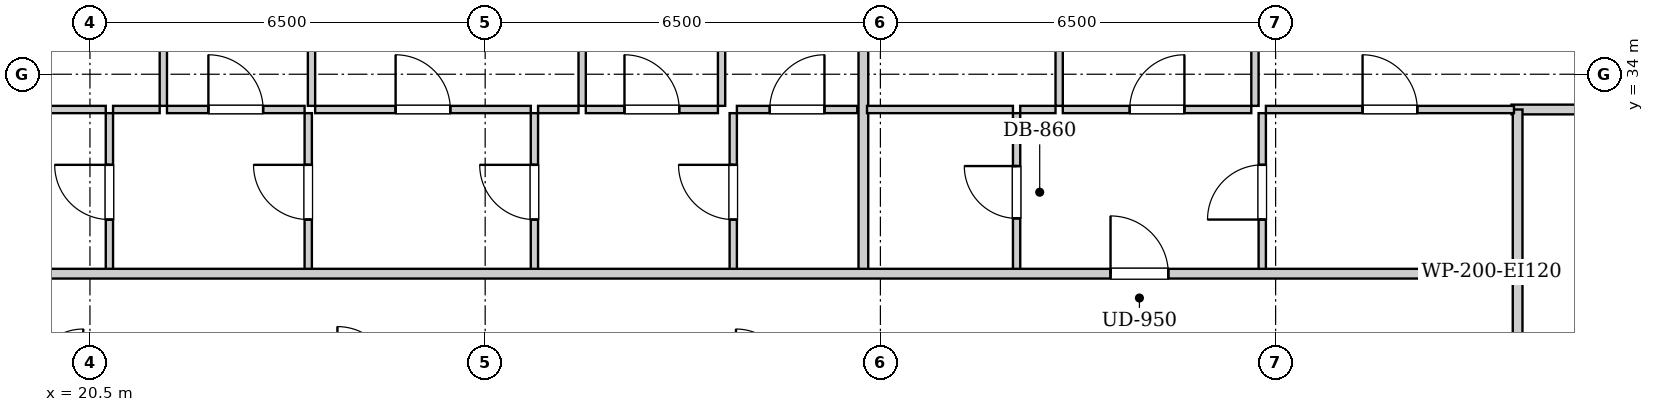
"""IFC4 building model, lengths in metres.
Left out: names, types, materials, properties, quantities, classifications, styles, units other than length and angle.
Written with IfcOpenShell. Run it as: python <this file> out.ifc"""

import sys

from ifc_helpers import new_model, si_unit, direction, frame, frame_2d, origin, place, context, subcontext, project, spatial, rectangle, extrude, element, fill, save


model = new_model("IFC4")
c1 = context("Model", 3, precision=1e-05, world=origin(), true_north=direction((0.0, 1.0)))
c2 = subcontext(c1, "Body", "Model", "MODEL_VIEW")
j1 = project(units=[si_unit("LENGTHUNIT", "METRE"), si_unit("PLANEANGLEUNIT", "RADIAN")], contexts=[c1])
p1 = place(None, origin())
s1 = spatial("IfcSite", under=j1, at=p1, CompositionType="ELEMENT")
p2 = place(p1, origin())
s2 = spatial("IfcBuilding", under=s1, at=p2, CompositionType="ELEMENT")
p3 = place(p2, frame((0.0, 0.0, 29.0)))
s3 = spatial("IfcBuildingStorey", under=s2, at=p3, CompositionType="ELEMENT", Elevation=29.0)
p4 = place(p3, frame((43.98, 28.98, 0.0), z_axis=(0.0, 0.0, 1.0), x_axis=(0.0, 1.0, 0.0)))
e1 = element("IfcWall", 1, at=p4, inside=s3, PredefinedType="PARTITIONING", context=c2, shape_type="SweptSolid", body=[
    extrude(rectangle(XDim=1.74, YDim=0.16, at=frame_2d((0.87, 0.0))), origin(), (0.0, 0.0, 1.0), 2.94),
])
p5 = place(p3, frame((20.82, 30.76, 0.0), z_axis=(0.0, 0.0, 1.0), x_axis=(0.0, 1.0, 0.0)))
e2 = element("IfcWall", 2, at=p5, inside=s3, PredefinedType="PARTITIONING", context=c2, shape_type="SweptSolid", body=[
    extrude(rectangle(XDim=2.6, YDim=0.12, at=frame_2d((1.3, 0.0))), origin(), (0.0, 0.0, 1.0), 2.94),
])
p6 = place(p5, frame((0.85, 0.0, 0.0)))
e3 = element("IfcOpeningElement", 3, at=p6, cuts=e2, PredefinedType="OPENING", context=c2, shape_type="SweptSolid", body=[
    extrude(rectangle(XDim=0.9, YDim=2.05, at=frame_2d((0.45, 1.025))), frame((0.0, 0.07, 0.0), z_axis=(0.0, -1.0, 0.0), x_axis=(1.0, 0.0, 0.0)), (0.0, 0.0, 1.0), 0.14),
])
p7 = place(p3, frame((17.664, 33.42, 0.0), z_axis=(0.0, 0.0, 1.0), x_axis=(1.0, 0.0, 0.0)))
e4 = element("IfcWall", 4, at=p7, inside=s3, PredefinedType="PARTITIONING", context=c2, shape_type="SweptSolid", body=[
    extrude(rectangle(XDim=3.096, YDim=0.12, at=frame_2d((1.548, 0.0))), origin(), (0.0, 0.0, 1.0), 2.94),
])
p8 = place(p7, frame((1.098, 0.0, 0.0)))
e5 = element("IfcOpeningElement", 5, at=p8, cuts=e4, PredefinedType="OPENING", context=c2, shape_type="SweptSolid", body=[
    extrude(rectangle(XDim=0.9, YDim=2.05, at=frame_2d((0.45, 1.025))), frame((0.0, 0.07, 0.0), z_axis=(0.0, -1.0, 0.0), x_axis=(1.0, 0.0, 0.0)), (0.0, 0.0, 1.0), 0.14),
])
p9 = place(p3, frame((24.09, 30.76, 0.0), z_axis=(0.0, 0.0, 1.0), x_axis=(0.0, 1.0, 0.0)))
e6 = element("IfcWall", 6, at=p9, inside=s3, PredefinedType="PARTITIONING", context=c2, shape_type="SweptSolid", body=[
    extrude(rectangle(XDim=2.6, YDim=0.12, at=frame_2d((1.3, 0.0))), origin(), (0.0, 0.0, 1.0), 2.94),
])
p10 = place(p9, frame((0.85, 0.0, 0.0)))
e7 = element("IfcOpeningElement", 7, at=p10, cuts=e6, PredefinedType="OPENING", context=c2, shape_type="SweptSolid", body=[
    extrude(rectangle(XDim=0.9, YDim=2.05, at=frame_2d((0.45, 1.025))), frame((0.0, 0.07, 0.0), z_axis=(0.0, -1.0, 0.0), x_axis=(1.0, 0.0, 0.0)), (0.0, 0.0, 1.0), 0.14),
])
p11 = place(p3, frame((20.88, 33.42, 0.0), z_axis=(0.0, 0.0, 1.0), x_axis=(1.0, 0.0, 0.0)))
e8 = element("IfcWall", 8, at=p11, inside=s3, PredefinedType="PARTITIONING", context=c2, shape_type="SweptSolid", body=[
    extrude(rectangle(XDim=0.767, YDim=0.12, at=frame_2d((0.384, 0.0))), origin(), (0.0, 0.0, 1.0), 2.94),
])
p12 = place(p3, frame((21.767, 33.42, 0.0), z_axis=(0.0, 0.0, 1.0), x_axis=(1.0, 0.0, 0.0)))
e9 = element("IfcWall", 9, at=p12, inside=s3, PredefinedType="PARTITIONING", context=c2, shape_type="SweptSolid", body=[
    extrude(rectangle(XDim=2.263, YDim=0.12, at=frame_2d((1.131, 0.0))), origin(), (0.0, 0.0, 1.0), 2.94),
])
p13 = place(p12, frame((0.681, 0.0, 0.0)))
e10 = element("IfcOpeningElement", 10, at=p13, cuts=e9, PredefinedType="OPENING", context=c2, shape_type="SweptSolid", body=[
    extrude(rectangle(XDim=0.9, YDim=2.05, at=frame_2d((0.45, 1.025))), frame((0.0, 0.07, 0.0), z_axis=(0.0, -1.0, 0.0), x_axis=(1.0, 0.0, 0.0)), (0.0, 0.0, 1.0), 0.14),
])
p14 = place(p3, frame((27.81, 30.76, 0.0), z_axis=(0.0, 0.0, 1.0), x_axis=(0.0, 1.0, 0.0)))
e11 = element("IfcWall", 11, at=p14, inside=s3, PredefinedType="PARTITIONING", context=c2, shape_type="SweptSolid", body=[
    extrude(rectangle(XDim=2.6, YDim=0.12, at=frame_2d((1.3, 0.0))), origin(), (0.0, 0.0, 1.0), 2.94),
])
p15 = place(p14, frame((0.85, 0.0, 0.0)))
e12 = element("IfcOpeningElement", 12, at=p15, cuts=e11, PredefinedType="OPENING", context=c2, shape_type="SweptSolid", body=[
    extrude(rectangle(XDim=0.9, YDim=2.05, at=frame_2d((0.45, 1.025))), frame((0.0, 0.07, 0.0), z_axis=(0.0, -1.0, 0.0), x_axis=(1.0, 0.0, 0.0)), (0.0, 0.0, 1.0), 0.14),
])
p16 = place(p3, frame((24.204, 33.42, 0.0), z_axis=(0.0, 0.0, 1.0), x_axis=(1.0, 0.0, 0.0)))
e13 = element("IfcWall", 13, at=p16, inside=s3, PredefinedType="PARTITIONING", context=c2, shape_type="SweptSolid", body=[
    extrude(rectangle(XDim=3.546, YDim=0.12, at=frame_2d((1.773, 0.0))), origin(), (0.0, 0.0, 1.0), 2.94),
])
p17 = place(p16, frame((1.323, 0.0, 0.0)))
e14 = element("IfcOpeningElement", 14, at=p17, cuts=e13, PredefinedType="OPENING", context=c2, shape_type="SweptSolid", body=[
    extrude(rectangle(XDim=0.9, YDim=2.05, at=frame_2d((0.45, 1.025))), frame((0.0, 0.07, 0.0), z_axis=(0.0, -1.0, 0.0), x_axis=(1.0, 0.0, 0.0)), (0.0, 0.0, 1.0), 0.14),
])
p18 = place(p3, frame((31.08, 30.76, 0.0), z_axis=(0.0, 0.0, 1.0), x_axis=(0.0, 1.0, 0.0)))
e15 = element("IfcWall", 15, at=p18, inside=s3, PredefinedType="PARTITIONING", context=c2, shape_type="SweptSolid", body=[
    extrude(rectangle(XDim=2.6, YDim=0.12, at=frame_2d((1.3, 0.0))), origin(), (0.0, 0.0, 1.0), 2.94),
])
p19 = place(p18, frame((0.85, 0.0, 0.0)))
e16 = element("IfcOpeningElement", 16, at=p19, cuts=e15, PredefinedType="OPENING", context=c2, shape_type="SweptSolid", body=[
    extrude(rectangle(XDim=0.9, YDim=2.05, at=frame_2d((0.45, 1.025))), frame((0.0, 0.07, 0.0), z_axis=(0.0, -1.0, 0.0), x_axis=(1.0, 0.0, 0.0)), (0.0, 0.0, 1.0), 0.14),
])
p20 = place(p3, frame((27.87, 33.42, 0.0), z_axis=(0.0, 0.0, 1.0), x_axis=(1.0, 0.0, 0.0)))
e17 = element("IfcWall", 17, at=p20, inside=s3, PredefinedType="PARTITIONING", context=c2, shape_type="SweptSolid", body=[
    extrude(rectangle(XDim=0.665, YDim=0.12, at=frame_2d((0.333, 0.0))), origin(), (0.0, 0.0, 1.0), 2.94),
])
p21 = place(p3, frame((28.655, 33.42, 0.0), z_axis=(0.0, 0.0, 1.0), x_axis=(1.0, 0.0, 0.0)))
e18 = element("IfcWall", 18, at=p21, inside=s3, PredefinedType="PARTITIONING", context=c2, shape_type="SweptSolid", body=[
    extrude(rectangle(XDim=2.173, YDim=0.12, at=frame_2d((1.086, 0.0))), origin(), (0.0, 0.0, 1.0), 2.94),
])
p22 = place(p21, frame((0.636, 0.0, 0.0)))
e19 = element("IfcOpeningElement", 19, at=p22, cuts=e18, PredefinedType="OPENING", context=c2, shape_type="SweptSolid", body=[
    extrude(rectangle(XDim=0.9, YDim=2.05, at=frame_2d((0.45, 1.025))), frame((0.0, 0.07, 0.0), z_axis=(0.0, -1.0, 0.0), x_axis=(1.0, 0.0, 0.0)), (0.0, 0.0, 1.0), 0.14),
])
p23 = place(p3, frame((31.14, 33.42, 0.0), z_axis=(0.0, 0.0, 1.0), x_axis=(1.0, 0.0, 0.0)))
e20 = element("IfcWall", 20, at=p23, inside=s3, PredefinedType="PARTITIONING", context=c2, shape_type="SweptSolid", body=[
    extrude(rectangle(XDim=1.98, YDim=0.12, at=frame_2d((0.99, 0.0))), origin(), (0.0, 0.0, 1.0), 2.94),
])
p24 = place(p23, frame((0.54, 0.0, 0.0)))
e21 = element("IfcOpeningElement", 21, at=p24, cuts=e20, PredefinedType="OPENING", context=c2, shape_type="SweptSolid", body=[
    extrude(rectangle(XDim=0.9, YDim=2.05, at=frame_2d((0.45, 1.025))), frame((0.0, 0.07, 0.0), z_axis=(0.0, -1.0, 0.0), x_axis=(1.0, 0.0, 0.0)), (0.0, 0.0, 1.0), 0.14),
])
p25 = place(p3, frame((21.707, 33.48, 0.0), z_axis=(0.0, 0.0, 1.0), x_axis=(0.0, 1.0, 0.0)))
e22 = element("IfcWall", 22, at=p25, inside=s3, PredefinedType="PARTITIONING", context=c2, shape_type="SweptSolid", body=[
    extrude(rectangle(XDim=13.84, YDim=0.12, at=frame_2d((6.92, 0.0))), origin(), (0.0, 0.0, 1.0), 2.94),
])
p26 = place(p25, frame((6.455, 0.0, 0.0)))
e23 = element("IfcOpeningElement", 23, at=p26, cuts=e22, PredefinedType="OPENING", context=c2, shape_type="SweptSolid", body=[
    extrude(rectangle(XDim=0.9, YDim=2.05, at=frame_2d((0.45, 1.025))), frame((0.0, 0.07, 0.0), z_axis=(0.0, -1.0, 0.0), x_axis=(1.0, 0.0, 0.0)), (0.0, 0.0, 1.0), 0.14),
])
p27 = place(p3, frame((24.144, 33.48, 0.0), z_axis=(0.0, 0.0, 1.0), x_axis=(0.0, 1.0, 0.0)))
e24 = element("IfcWall", 24, at=p27, inside=s3, PredefinedType="PARTITIONING", context=c2, shape_type="SweptSolid", body=[
    extrude(rectangle(XDim=13.84, YDim=0.12, at=frame_2d((6.92, 0.0))), origin(), (0.0, 0.0, 1.0), 2.94),
])
p28 = place(p27, frame((6.455, 0.0, 0.0)))
e25 = element("IfcOpeningElement", 25, at=p28, cuts=e24, PredefinedType="OPENING", context=c2, shape_type="SweptSolid", body=[
    extrude(rectangle(XDim=0.9, YDim=2.05, at=frame_2d((0.45, 1.025))), frame((0.0, 0.07, 0.0), z_axis=(0.0, -1.0, 0.0), x_axis=(1.0, 0.0, 0.0)), (0.0, 0.0, 1.0), 0.14),
])
p29 = place(p3, frame((28.595, 33.48, 0.0), z_axis=(0.0, 0.0, 1.0), x_axis=(0.0, 1.0, 0.0)))
e26 = element("IfcWall", 26, at=p29, inside=s3, PredefinedType="PARTITIONING", context=c2, shape_type="SweptSolid", body=[
    extrude(rectangle(XDim=13.84, YDim=0.12, at=frame_2d((6.92, 0.0))), origin(), (0.0, 0.0, 1.0), 2.94),
])
p30 = place(p29, frame((6.455, 0.0, 0.0)))
e27 = element("IfcOpeningElement", 27, at=p30, cuts=e26, PredefinedType="OPENING", context=c2, shape_type="SweptSolid", body=[
    extrude(rectangle(XDim=0.9, YDim=2.05, at=frame_2d((0.45, 1.025))), frame((0.0, 0.07, 0.0), z_axis=(0.0, -1.0, 0.0), x_axis=(1.0, 0.0, 0.0)), (0.0, 0.0, 1.0), 0.14),
])
p31 = place(p3, frame((30.888, 33.48, 0.0), z_axis=(0.0, 0.0, 1.0), x_axis=(0.0, 1.0, 0.0)))
e28 = element("IfcWall", 28, at=p31, inside=s3, PredefinedType="PARTITIONING", context=c2, shape_type="SweptSolid", body=[
    extrude(rectangle(XDim=13.84, YDim=0.12, at=frame_2d((6.92, 0.0))), origin(), (0.0, 0.0, 1.0), 2.94),
])
p32 = place(p31, frame((6.455, 0.0, 0.0)))
e29 = element("IfcOpeningElement", 29, at=p32, cuts=e28, PredefinedType="OPENING", context=c2, shape_type="SweptSolid", body=[
    extrude(rectangle(XDim=0.9, YDim=2.05, at=frame_2d((0.45, 1.025))), frame((0.0, 0.07, 0.0), z_axis=(0.0, -1.0, 0.0), x_axis=(1.0, 0.0, 0.0)), (0.0, 0.0, 1.0), 0.14),
])
p33 = place(p3, frame((43.88, 33.42, 0.0), z_axis=(0.0, 0.0, 1.0), x_axis=(1.0, 0.0, 0.0)))
e30 = element("IfcWall", 30, at=p33, inside=s3, PredefinedType="PARTITIONING", context=c2, shape_type="SweptSolid", body=[
    extrude(rectangle(XDim=2.34, YDim=0.16, at=frame_2d((1.17, 0.0))), origin(), (0.0, 0.0, 1.0), 2.94),
])
p34 = place(p3, frame((43.98, 30.76, 0.0), z_axis=(0.0, 0.0, 1.0), x_axis=(0.0, 1.0, 0.0)))
e31 = element("IfcWall", 31, at=p34, inside=s3, PredefinedType="PARTITIONING", context=c2, shape_type="SweptSolid", body=[
    extrude(rectangle(XDim=2.66, YDim=0.16, at=frame_2d((1.33, 0.0))), origin(), (0.0, 0.0, 1.0), 2.94),
])
p35 = place(p3, frame((33.22, 30.76, 0.0), z_axis=(0.0, 0.0, 1.0), x_axis=(0.0, 1.0, 0.0)))
e32 = element("IfcWall", 32, at=p35, inside=s3, PredefinedType="PARTITIONING", context=c2, shape_type="SweptSolid", body=[
    extrude(rectangle(XDim=16.56, YDim=0.16, at=frame_2d((8.28, 0.0))), origin(), (0.0, 0.0, 1.0), 2.155),
])
p36 = place(p3, frame((35.74, 30.76, 0.0), z_axis=(0.0, 0.0, 1.0), x_axis=(0.0, 1.0, 0.0)))
e33 = element("IfcWall", 33, at=p36, inside=s3, PredefinedType="PARTITIONING", context=c2, shape_type="SweptSolid", body=[
    extrude(rectangle(XDim=2.6, YDim=0.12, at=frame_2d((1.3, 0.0))), origin(), (0.0, 0.0, 1.0), 2.94),
])
p37 = place(p36, frame((0.87, 0.0, 0.0)))
e34 = element("IfcOpeningElement", 34, at=p37, cuts=e33, PredefinedType="OPENING", context=c2, shape_type="SweptSolid", body=[
    extrude(rectangle(XDim=0.86, YDim=2.05, at=frame_2d((0.43, 1.025))), frame((0.0, 0.07, 0.0), z_axis=(0.0, -1.0, 0.0), x_axis=(1.0, 0.0, 0.0)), (0.0, 0.0, 1.0), 0.14),
])
p38 = place(p3, frame((33.28, 33.42, 0.0), z_axis=(0.0, 0.0, 1.0), x_axis=(1.0, 0.0, 0.0)))
e35 = element("IfcWall", 35, at=p38, inside=s3, PredefinedType="PARTITIONING", context=c2, shape_type="SweptSolid", body=[
    extrude(rectangle(XDim=2.4, YDim=0.12, at=frame_2d((1.2, 0.0))), origin(), (0.0, 0.0, 1.0), 2.94),
])
p39 = place(p3, frame((39.78, 30.76, 0.0), z_axis=(0.0, 0.0, 1.0), x_axis=(0.0, 1.0, 0.0)))
e36 = element("IfcWall", 36, at=p39, inside=s3, PredefinedType="PARTITIONING", context=c2, shape_type="SweptSolid", body=[
    extrude(rectangle(XDim=2.6, YDim=0.12, at=frame_2d((1.3, 0.0))), origin(), (0.0, 0.0, 1.0), 2.94),
])
p40 = place(p39, frame((0.85, 0.0, 0.0)))
e37 = element("IfcOpeningElement", 37, at=p40, cuts=e36, PredefinedType="OPENING", context=c2, shape_type="SweptSolid", body=[
    extrude(rectangle(XDim=0.9, YDim=2.05, at=frame_2d((0.45, 1.025))), frame((0.0, 0.07, 0.0), z_axis=(0.0, -1.0, 0.0), x_axis=(1.0, 0.0, 0.0)), (0.0, 0.0, 1.0), 0.14),
])
p41 = place(p3, frame((35.8, 33.42, 0.0), z_axis=(0.0, 0.0, 1.0), x_axis=(1.0, 0.0, 0.0)))
e38 = element("IfcWall", 38, at=p41, inside=s3, PredefinedType="PARTITIONING", context=c2, shape_type="SweptSolid", body=[
    extrude(rectangle(XDim=0.58, YDim=0.12, at=frame_2d((0.29, 0.0))), origin(), (0.0, 0.0, 1.0), 2.94),
])
p42 = place(p3, frame((36.5, 33.42, 0.0), z_axis=(0.0, 0.0, 1.0), x_axis=(1.0, 0.0, 0.0)))
e39 = element("IfcWall", 39, at=p42, inside=s3, PredefinedType="PARTITIONING", context=c2, shape_type="SweptSolid", body=[
    extrude(rectangle(XDim=3.1, YDim=0.12, at=frame_2d((1.55, 0.0))), origin(), (0.0, 0.0, 1.0), 2.94),
])
p43 = place(p42, frame((1.1, 0.0, 0.0)))
e40 = element("IfcOpeningElement", 40, at=p43, cuts=e39, PredefinedType="OPENING", context=c2, shape_type="SweptSolid", body=[
    extrude(rectangle(XDim=0.9, YDim=2.05, at=frame_2d((0.45, 1.025))), frame((0.0, 0.07, 0.0), z_axis=(0.0, -1.0, 0.0), x_axis=(1.0, 0.0, 0.0)), (0.0, 0.0, 1.0), 0.14),
])
p44 = place(p3, frame((39.84, 33.42, 0.0), z_axis=(0.0, 0.0, 1.0), x_axis=(1.0, 0.0, 0.0)))
e41 = element("IfcWall", 41, at=p44, inside=s3, PredefinedType="PARTITIONING", context=c2, shape_type="SweptSolid", body=[
    extrude(rectangle(XDim=4.08, YDim=0.12, at=frame_2d((2.04, 0.0))), origin(), (0.0, 0.0, 1.0), 2.94),
])
p45 = place(p44, frame((1.59, 0.0, 0.0)))
e42 = element("IfcOpeningElement", 42, at=p45, cuts=e41, PredefinedType="OPENING", context=c2, shape_type="SweptSolid", body=[
    extrude(rectangle(XDim=0.9, YDim=2.05, at=frame_2d((0.45, 1.025))), frame((0.0, 0.07, 0.0), z_axis=(0.0, -1.0, 0.0), x_axis=(1.0, 0.0, 0.0)), (0.0, 0.0, 1.0), 0.14),
])
p46 = place(p3, frame((36.44, 33.48, 0.0), z_axis=(0.0, 0.0, 1.0), x_axis=(0.0, 1.0, 0.0)))
e43 = element("IfcWall", 43, at=p46, inside=s3, PredefinedType="PARTITIONING", context=c2, shape_type="SweptSolid", body=[
    extrude(rectangle(XDim=13.84, YDim=0.12, at=frame_2d((6.92, 0.0))), origin(), (0.0, 0.0, 1.0), 2.94),
])
p47 = place(p46, frame((6.455, 0.0, 0.0)))
e44 = element("IfcOpeningElement", 44, at=p47, cuts=e43, PredefinedType="OPENING", context=c2, shape_type="SweptSolid", body=[
    extrude(rectangle(XDim=0.9, YDim=2.05, at=frame_2d((0.45, 1.025))), frame((0.0, 0.07, 0.0), z_axis=(0.0, -1.0, 0.0), x_axis=(1.0, 0.0, 0.0)), (0.0, 0.0, 1.0), 0.14),
])
p48 = place(p3, frame((39.66, 33.48, 0.0), z_axis=(0.0, 0.0, 1.0), x_axis=(0.0, 1.0, 0.0)))
e45 = element("IfcWall", 45, at=p48, inside=s3, PredefinedType="PARTITIONING", context=c2, shape_type="SweptSolid", body=[
    extrude(rectangle(XDim=11.69, YDim=0.12, at=frame_2d((5.845, 0.0))), origin(), (0.0, 0.0, 1.0), 2.94),
])
p49 = place(p48, frame((5.395, 0.0, 0.0)))
e46 = element("IfcOpeningElement", 46, at=p49, cuts=e45, PredefinedType="OPENING", context=c2, shape_type="SweptSolid", body=[
    extrude(rectangle(XDim=0.9, YDim=2.05, at=frame_2d((0.45, 1.025))), frame((0.0, 0.07, 0.0), z_axis=(0.0, -1.0, 0.0), x_axis=(1.0, 0.0, 0.0)), (0.0, 0.0, 1.0), 0.14),
])
p50 = place(p3, frame((10.05, 30.72, 0.0), z_axis=(0.0, 0.0, 1.0), x_axis=(1.0, 0.0, 0.0)))
e47 = element("IfcWall", 47, at=p50, inside=s3, PredefinedType="PARTITIONING", context=c2, shape_type="SweptSolid", body=[
    extrude(rectangle(XDim=33.9, YDim=0.16, at=frame_2d((16.95, 0.0))), origin(), (0.0, 0.0, 1.0), 2.94),
])
p51 = place(p50, frame((4.295, 0.0, 0.0)))
e48 = element("IfcOpeningElement", 48, at=p51, cuts=e47, PredefinedType="OPENING", context=c2, shape_type="SweptSolid", body=[
    extrude(rectangle(XDim=0.95, YDim=2.1, at=frame_2d((0.475, 1.05))), frame((0.0, 0.09, 0.0), z_axis=(0.0, -1.0, 0.0), x_axis=(1.0, 0.0, 0.0)), (0.0, 0.0, 1.0), 0.18),
])
p52 = place(p50, frame((27.235, 0.0, 0.0)))
e49 = element("IfcOpeningElement", 49, at=p52, cuts=e47, PredefinedType="OPENING", context=c2, shape_type="SweptSolid", body=[
    extrude(rectangle(XDim=0.95, YDim=2.1, at=frame_2d((0.475, 1.05))), frame((0.0, 0.09, 0.0), z_axis=(0.0, -1.0, 0.0), x_axis=(1.0, 0.0, 0.0)), (0.0, 0.0, 1.0), 0.18),
])
p53 = place(p6, origin())
e50 = element("IfcDoor", 50, at=p53, inside=s3, OperationType="SINGLE_SWING_RIGHT", PredefinedType="DOOR", context=c2, shape_type="SweptSolid", body=[
    extrude(rectangle(XDim=0.9, YDim=2.05, at=frame_2d((0.45, 1.025))), frame((0.0, 0.025, 0.0), z_axis=(0.0, -1.0, 0.0), x_axis=(1.0, 0.0, 0.0)), (0.0, 0.0, 1.0), 0.05),
])
fill(e3, e50)
p54 = place(p10, origin())
e51 = element("IfcDoor", 51, at=p54, inside=s3, OperationType="SINGLE_SWING_RIGHT", PredefinedType="DOOR", context=c2, shape_type="SweptSolid", body=[
    extrude(rectangle(XDim=0.9, YDim=2.05, at=frame_2d((0.45, 1.025))), frame((0.0, 0.025, 0.0), z_axis=(0.0, -1.0, 0.0), x_axis=(1.0, 0.0, 0.0)), (0.0, 0.0, 1.0), 0.05),
])
fill(e7, e51)
p55 = place(p13, origin())
e52 = element("IfcDoor", 52, at=p55, inside=s3, OperationType="SINGLE_SWING_LEFT", PredefinedType="DOOR", context=c2, shape_type="SweptSolid", body=[
    extrude(rectangle(XDim=0.9, YDim=2.05, at=frame_2d((0.45, 1.025))), frame((0.0, 0.025, 0.0), z_axis=(0.0, -1.0, 0.0), x_axis=(1.0, 0.0, 0.0)), (0.0, 0.0, 1.0), 0.05),
])
fill(e10, e52)
p56 = place(p15, origin())
e53 = element("IfcDoor", 53, at=p56, inside=s3, OperationType="SINGLE_SWING_RIGHT", PredefinedType="DOOR", context=c2, shape_type="SweptSolid", body=[
    extrude(rectangle(XDim=0.9, YDim=2.05, at=frame_2d((0.45, 1.025))), frame((0.0, 0.025, 0.0), z_axis=(0.0, -1.0, 0.0), x_axis=(1.0, 0.0, 0.0)), (0.0, 0.0, 1.0), 0.05),
])
fill(e12, e53)
p57 = place(p17, origin())
e54 = element("IfcDoor", 54, at=p57, inside=s3, OperationType="SINGLE_SWING_LEFT", PredefinedType="DOOR", context=c2, shape_type="SweptSolid", body=[
    extrude(rectangle(XDim=0.9, YDim=2.05, at=frame_2d((0.45, 1.025))), frame((0.0, 0.025, 0.0), z_axis=(0.0, -1.0, 0.0), x_axis=(1.0, 0.0, 0.0)), (0.0, 0.0, 1.0), 0.05),
])
fill(e14, e54)
p58 = place(p19, origin())
e55 = element("IfcDoor", 55, at=p58, inside=s3, OperationType="SINGLE_SWING_RIGHT", PredefinedType="DOOR", context=c2, shape_type="SweptSolid", body=[
    extrude(rectangle(XDim=0.9, YDim=2.05, at=frame_2d((0.45, 1.025))), frame((0.0, 0.025, 0.0), z_axis=(0.0, -1.0, 0.0), x_axis=(1.0, 0.0, 0.0)), (0.0, 0.0, 1.0), 0.05),
])
fill(e16, e55)
p59 = place(p22, origin())
e56 = element("IfcDoor", 56, at=p59, inside=s3, OperationType="SINGLE_SWING_LEFT", PredefinedType="DOOR", context=c2, shape_type="SweptSolid", body=[
    extrude(rectangle(XDim=0.9, YDim=2.05, at=frame_2d((0.45, 1.025))), frame((0.0, 0.025, 0.0), z_axis=(0.0, -1.0, 0.0), x_axis=(1.0, 0.0, 0.0)), (0.0, 0.0, 1.0), 0.05),
])
fill(e19, e56)
p60 = place(p24, origin())
e57 = element("IfcDoor", 57, at=p60, inside=s3, OperationType="SINGLE_SWING_RIGHT", PredefinedType="DOOR", context=c2, shape_type="SweptSolid", body=[
    extrude(rectangle(XDim=0.9, YDim=2.05, at=frame_2d((0.45, 1.025))), frame((0.0, 0.025, 0.0), z_axis=(0.0, -1.0, 0.0), x_axis=(1.0, 0.0, 0.0)), (0.0, 0.0, 1.0), 0.05),
])
fill(e21, e57)
p61 = place(p37, origin())
e58 = element("IfcDoor", 58, at=p61, inside=s3, OperationType="SINGLE_SWING_RIGHT", PredefinedType="DOOR", context=c2, shape_type="SweptSolid", body=[
    extrude(rectangle(XDim=0.86, YDim=2.05, at=frame_2d((0.43, 1.025))), frame((0.0, 0.025, 0.0), z_axis=(0.0, -1.0, 0.0), x_axis=(1.0, 0.0, 0.0)), (0.0, 0.0, 1.0), 0.05),
])
fill(e34, e58)
p62 = place(p40, origin())
e59 = element("IfcDoor", 59, at=p62, inside=s3, OperationType="SINGLE_SWING_LEFT", PredefinedType="DOOR", context=c2, shape_type="SweptSolid", body=[
    extrude(rectangle(XDim=0.9, YDim=2.05, at=frame_2d((0.45, 1.025))), frame((0.0, 0.025, 0.0), z_axis=(0.0, -1.0, 0.0), x_axis=(1.0, 0.0, 0.0)), (0.0, 0.0, 1.0), 0.05),
])
fill(e37, e59)
p63 = place(p43, origin())
e60 = element("IfcDoor", 60, at=p63, inside=s3, OperationType="SINGLE_SWING_RIGHT", PredefinedType="DOOR", context=c2, shape_type="SweptSolid", body=[
    extrude(rectangle(XDim=0.9, YDim=2.05, at=frame_2d((0.45, 1.025))), frame((0.0, 0.025, 0.0), z_axis=(0.0, -1.0, 0.0), x_axis=(1.0, 0.0, 0.0)), (0.0, 0.0, 1.0), 0.05),
])
fill(e40, e60)
p64 = place(p45, origin())
e61 = element("IfcDoor", 61, at=p64, inside=s3, OperationType="SINGLE_SWING_LEFT", PredefinedType="DOOR", context=c2, shape_type="SweptSolid", body=[
    extrude(rectangle(XDim=0.9, YDim=2.05, at=frame_2d((0.45, 1.025))), frame((0.0, 0.025, 0.0), z_axis=(0.0, -1.0, 0.0), x_axis=(1.0, 0.0, 0.0)), (0.0, 0.0, 1.0), 0.05),
])
fill(e42, e61)
p65 = place(p52, origin())
e62 = element("IfcDoor", 62, at=p65, inside=s3, OperationType="SINGLE_SWING_LEFT", PredefinedType="DOOR", context=c2, shape_type="SweptSolid", body=[
    extrude(rectangle(XDim=0.95, YDim=2.1, at=frame_2d((0.475, 1.05))), frame((0.0, 0.025, 0.0), z_axis=(0.0, -1.0, 0.0), x_axis=(1.0, 0.0, 0.0)), (0.0, 0.0, 1.0), 0.05),
])
fill(e49, e62)
save(model, sys.argv[1])
